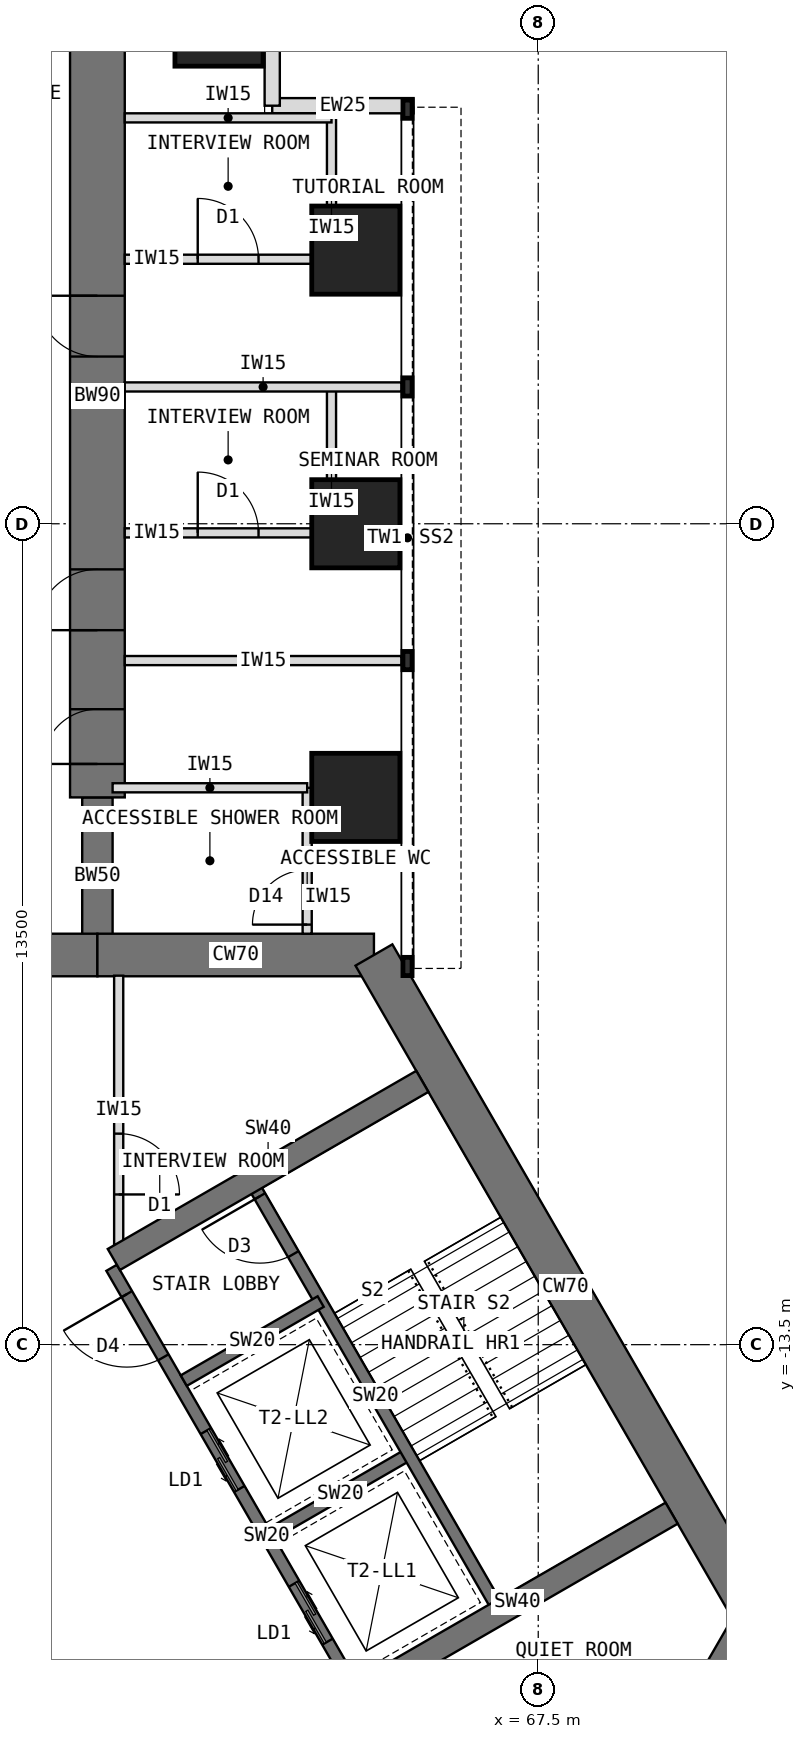
"""IFC4 building model, lengths in metres.
Left out: names, types, materials, properties, quantities, classifications, styles, units other than length and angle.
Written with IfcOpenShell. Run it as: python <this file> out.ifc"""

import sys

from ifc_helpers import new_model, si_unit, direction, frame, frame_2d, origin, origin_2d, place, context, subcontext, project, spatial, rectangle, extrude, element, fill, save


model = new_model("IFC4")
c1 = context("Model", 3, precision=1e-05, world=origin(), true_north=direction((0.0, 1.0)))
c2 = subcontext(c1, "Body", "Model", "MODEL_VIEW")
j1 = project(units=[si_unit("LENGTHUNIT", "METRE"), si_unit("PLANEANGLEUNIT", "RADIAN")], contexts=[c1])
p1 = place(None, origin())
s1 = spatial("IfcSite", under=j1, at=p1, CompositionType="ELEMENT")
p2 = place(p1, origin())
s2 = spatial("IfcBuilding", under=s1, at=p2, CompositionType="ELEMENT")
p3 = place(p2, frame((0.0, 0.0, 64.5)))
s3 = spatial("IfcBuildingStorey", under=s2, at=p3, CompositionType="ELEMENT", Elevation=64.5)
p4 = place(p3, frame((64.798, -7.092, 0.0), z_axis=(0.0, 0.0, 1.0), x_axis=(-1.0, 0.0, 0.0)))
e1 = element("IfcWall", 1, at=p4, inside=s3, PredefinedType="SHEAR", context=c2, shape_type="SweptSolid", body=[
    extrude(rectangle(XDim=4.548, YDim=0.7, at=frame_2d((2.274, 0.0))), origin(), (0.0, 0.0, 1.0), 4.0),
])
p5 = place(p3, frame((60.25, -7.092, 0.0), z_axis=(0.0, 0.0, 1.0), x_axis=(-1.0, 0.0, 0.0)))
e2 = element("IfcWall", 2, at=p5, inside=s3, PredefinedType="SHEAR", context=c2, shape_type="SweptSolid", body=[
    extrude(rectangle(XDim=3.5, YDim=0.7, at=frame_2d((1.75, 0.0))), origin(), (0.0, 0.0, 1.0), 4.0),
])
p6 = place(p5, frame((0.85, 0.0, 0.0)))
e3 = element("IfcOpeningElement", 3, at=p6, cuts=e2, PredefinedType="OPENING", context=c2, shape_type="SweptSolid", body=[
    extrude(rectangle(XDim=1.8, YDim=2.1, at=frame_2d((0.9, 1.05))), frame((0.0, 0.36, 0.0), z_axis=(0.0, -1.0, 0.0), x_axis=(1.0, 0.0, 0.0)), (0.0, 0.0, 1.0), 0.72),
])
p7 = place(p3, frame((68.822, -21.939, 0.0), z_axis=(0.0, 0.0, 1.0), x_axis=(0.500024481964, 0.866011268655, 0.0)))
e4 = element("IfcWall", 4, at=p7, inside=s3, PredefinedType="SHEAR", context=c2, shape_type="SweptSolid", body=[
    extrude(rectangle(XDim=4.548, YDim=0.7, at=frame_2d((2.274, 0.0))), origin(), (0.0, 0.0, 1.0), 4.0),
])
p8 = place(p3, frame((71.096, -18.0, 0.0), z_axis=(0.0, 0.0, 1.0), x_axis=(-0.500005998175, 0.866021940709, 0.0)))
e5 = element("IfcWall", 5, at=p8, inside=s3, PredefinedType="SHEAR", context=c2, shape_type="SweptSolid", body=[
    extrude(rectangle(XDim=12.596, YDim=0.7, at=frame_2d((6.298, 0.0))), origin(), (0.0, 0.0, 1.0), 4.0),
])
p9 = place(p3, frame((60.25, -7.092, 0.0), z_axis=(0.0, 0.0, 1.0), x_axis=(0.0, 1.0, 0.0)))
e6 = element("IfcWall", 6, at=p9, inside=s3, PredefinedType="SHEAR", context=c2, shape_type="SweptSolid", body=[
    extrude(rectangle(XDim=2.592, YDim=0.5, at=frame_2d((1.296, 0.0))), origin(), (0.0, 0.0, 1.0), 4.0),
])
p10 = place(p3, frame((60.25, -4.5, 0.0), z_axis=(0.0, 0.0, 1.0), x_axis=(0.0, 1.0, 0.0)))
e7 = element("IfcWall", 7, at=p10, inside=s3, PredefinedType="SHEAR", context=c2, shape_type="SweptSolid", body=[
    extrude(rectangle(XDim=13.2, YDim=0.9, at=frame_2d((6.6, 0.0))), origin(), (0.0, 0.0, 1.0), 4.0),
])
p11 = place(p10, frame((0.55, 0.0, 0.0)))
e8 = element("IfcOpeningElement", 8, at=p11, cuts=e7, PredefinedType="OPENING", context=c2, shape_type="SweptSolid", body=[
    extrude(rectangle(XDim=0.9, YDim=2.1, at=frame_2d((0.45, 1.05))), frame((0.0, 0.46, 0.0), z_axis=(0.0, -1.0, 0.0), x_axis=(1.0, 0.0, 0.0)), (0.0, 0.0, 1.0), 0.92),
])
p12 = place(p10, frame((2.75, 0.0, 0.0)))
e9 = element("IfcOpeningElement", 9, at=p12, cuts=e7, PredefinedType="OPENING", context=c2, shape_type="SweptSolid", body=[
    extrude(rectangle(XDim=1.0, YDim=2.1, at=frame_2d((0.5, 1.05))), frame((0.0, 0.46, 0.0), z_axis=(0.0, -1.0, 0.0), x_axis=(1.0, 0.0, 0.0)), (0.0, 0.0, 1.0), 0.92),
])
p13 = place(p10, frame((7.25, 0.0, 0.0)))
e10 = element("IfcOpeningElement", 10, at=p13, cuts=e7, PredefinedType="OPENING", context=c2, shape_type="SweptSolid", body=[
    extrude(rectangle(XDim=1.0, YDim=2.1, at=frame_2d((0.5, 1.05))), frame((0.0, 0.46, 0.0), z_axis=(0.0, -1.0, 0.0), x_axis=(1.0, 0.0, 0.0)), (0.0, 0.0, 1.0), 0.92),
])
for number, where, z_axis, x_axis in (
    (11, (64.5, -4.5, 0.0), (0.0, 0.0, 1.0), (1.0, 0.0, 0.0)),
    (12, (64.5, 0.0, 0.0), (0.0, 0.0, 1.0), (1.0, 0.0, 0.0)),
    (13, (64.5, 4.5, 0.0), (0.0, 0.0, 1.0), (1.0, 0.0, 0.0)),
    (14, (62.25, 8.25, 0.0), (0.0, 0.0, 1.0), (1.0, 0.0, 0.0)),
):
    element("IfcColumn", number, at=place(p3, frame(where, z_axis=z_axis, x_axis=x_axis)), inside=s3, PredefinedType="COLUMN", context=c2, shape_type="SweptSolid", body=[
        extrude(rectangle(XDim=1.45, YDim=1.45, at=origin_2d()), origin(), (0.0, 0.0, 1.0), 4.0),
    ])
for number, where, z_axis, x_axis in (
    (15, (65.45, 6.875, 0.0), (0.0, 0.0, 1.0), (-1.0, 0.0, 0.0)),
    (16, (63.125, 6.875, 0.0), (0.0, 0.0, 1.0), (0.0, 1.0, 0.0)),
):
    element("IfcWall", number, at=place(p3, frame(where, z_axis=z_axis, x_axis=x_axis)), inside=s3, PredefinedType="STANDARD", context=c2, shape_type="SweptSolid", body=[
        extrude(rectangle(XDim=2.325, YDim=0.25, at=frame_2d((1.163, 0.0))), origin(), (0.0, 0.0, 1.0), 3.8),
    ])
p14 = place(p3, frame((64.484, -19.164, 0.0), z_axis=(0.0, 0.0, 1.0), x_axis=(-0.49999894854, 0.866026010844, 0.0)))
e17 = element("IfcWall", 17, at=p14, inside=s3, PredefinedType="SHEAR", context=c2, shape_type="SweptSolid", body=[
    extrude(rectangle(XDim=8.0, YDim=0.2, at=frame_2d((4.0, 0.0))), origin(), (0.0, 0.0, 1.0), 4.0),
])
p15 = place(p14, frame((6.3, 0.0, 0.0)))
e18 = element("IfcOpeningElement", 18, at=p15, cuts=e17, PredefinedType="OPENING", context=c2, shape_type="SweptSolid", body=[
    extrude(rectangle(XDim=1.2, YDim=2.1, at=frame_2d((0.6, 1.05))), frame((0.0, 0.11, 0.0), z_axis=(0.0, -1.0, 0.0), x_axis=(1.0, 0.0, 0.0)), (0.0, 0.0, 1.0), 0.22),
])
p16 = place(p14, frame((0.9, 0.0, 0.0)))
e19 = element("IfcOpeningElement", 19, at=p16, cuts=e17, PredefinedType="OPENING", context=c2, shape_type="SweptSolid", body=[
    extrude(rectangle(XDim=1.1, YDim=2.2, at=frame_2d((0.55, 1.1))), frame((0.0, 0.11, 0.0), z_axis=(0.0, -1.0, 0.0), x_axis=(1.0, 0.0, 0.0)), (0.0, 0.0, 1.0), 0.22),
])
p17 = place(p14, frame((3.8, 0.0, 0.0)))
e20 = element("IfcOpeningElement", 20, at=p17, cuts=e17, PredefinedType="OPENING", context=c2, shape_type="SweptSolid", body=[
    extrude(rectangle(XDim=1.1, YDim=2.2, at=frame_2d((0.55, 1.1))), frame((0.0, 0.11, 0.0), z_axis=(0.0, -1.0, 0.0), x_axis=(1.0, 0.0, 0.0)), (0.0, 0.0, 1.0), 0.22),
])
p18 = place(p3, frame((63.12, -16.603, 0.0), z_axis=(0.0, 0.0, 1.0), x_axis=(0.866062058628, 0.499936506574, 0.0)))
e21 = element("IfcWall", 21, at=p18, inside=s3, PredefinedType="SHEAR", context=c2, shape_type="SweptSolid", body=[
    extrude(rectangle(XDim=2.6, YDim=0.2, at=frame_2d((1.3, 0.0))), origin(), (0.0, 0.0, 1.0), 4.0),
])
p19 = place(p3, frame((61.67, -14.091, 0.0), z_axis=(0.0, 0.0, 1.0), x_axis=(0.86603858612, 0.49997716683, 0.0)))
e22 = element("IfcWall", 22, at=p19, inside=s3, PredefinedType="SHEAR", context=c2, shape_type="SweptSolid", body=[
    extrude(rectangle(XDim=2.6, YDim=0.2, at=frame_2d((1.3, 0.0))), origin(), (0.0, 0.0, 1.0), 4.0),
])
p20 = place(p3, frame((66.822, -17.814, 0.0), z_axis=(0.0, 0.0, 1.0), x_axis=(-0.49999894854, 0.866026010844, 0.0)))
e23 = element("IfcWall", 23, at=p20, inside=s3, PredefinedType="SHEAR", context=c2, shape_type="SweptSolid", body=[
    extrude(rectangle(XDim=8.0, YDim=0.2, at=frame_2d((4.0, 0.0))), origin(), (0.0, 0.0, 1.0), 4.0),
])
p21 = place(p20, frame((6.7, 0.0, 0.0)))
e24 = element("IfcOpeningElement", 24, at=p21, cuts=e23, PredefinedType="OPENING", context=c2, shape_type="SweptSolid", body=[
    extrude(rectangle(XDim=1.1, YDim=2.1, at=frame_2d((0.55, 1.05))), frame((0.0, 0.11, 0.0), z_axis=(0.0, -1.0, 0.0), x_axis=(1.0, 0.0, 0.0)), (0.0, 0.0, 1.0), 0.22),
])
for number, where, z_axis, x_axis in (
    (25, (60.52, -12.099, 0.0), (0.0, 0.0, 1.0), (0.866, 0.5, 0.0)),
    (26, (64.62, -19.201, 0.0), (0.0, 0.0, 1.0), (0.866, 0.5, 0.0)),
):
    element("IfcWall", number, at=place(p3, frame(where, z_axis=z_axis, x_axis=x_axis)), inside=s3, PredefinedType="SHEAR", context=c2, shape_type="SweptSolid", body=[
        extrude(rectangle(XDim=5.858, YDim=0.4, at=frame_2d((2.929, 0.0))), origin(), (0.0, 0.0, 1.0), 4.0),
    ])
for number, where, z_axis, x_axis in (
    (27, (60.7, -2.25, 0.0), (0.0, 0.0, 1.0), (1.0, 0.0, 0.0)),
    (28, (60.7, 2.25, 0.0), (0.0, 0.0, 1.0), (1.0, 0.0, 0.0)),
):
    element("IfcWall", number, at=place(p3, frame(where, z_axis=z_axis, x_axis=x_axis)), inside=s3, PredefinedType="PARTITIONING", context=c2, shape_type="SweptSolid", body=[
        extrude(rectangle(XDim=4.55, YDim=0.15, at=frame_2d((2.275, 0.0))), origin(), (0.0, 0.0, 1.0), 3.8),
    ])
p22 = place(p3, frame((64.1, -0.15, 0.0), z_axis=(0.0, 0.0, 1.0), x_axis=(0.0, 1.0, 0.0)))
e29 = element("IfcWall", 29, at=p22, inside=s3, PredefinedType="PARTITIONING", context=c2, shape_type="SweptSolid", body=[
    extrude(rectangle(XDim=2.4, YDim=0.15, at=frame_2d((1.2, 0.0))), origin(), (0.0, 0.0, 1.0), 3.8),
])
p23 = place(p3, frame((60.7, -0.15, 0.0), z_axis=(0.0, 0.0, 1.0), x_axis=(1.0, 0.0, 0.0)))
e30 = element("IfcWall", 30, at=p23, inside=s3, PredefinedType="PARTITIONING", context=c2, shape_type="SweptSolid", body=[
    extrude(rectangle(XDim=3.4, YDim=0.15, at=frame_2d((1.7, 0.0))), origin(), (0.0, 0.0, 1.0), 3.8),
])
p24 = place(p23, frame((1.2, 0.0, 0.0)))
e31 = element("IfcOpeningElement", 31, at=p24, cuts=e30, PredefinedType="OPENING", context=c2, shape_type="SweptSolid", body=[
    extrude(rectangle(XDim=1.0, YDim=2.1, at=frame_2d((0.5, 1.05))), frame((0.0, 0.085, 0.0), z_axis=(0.0, -1.0, 0.0), x_axis=(1.0, 0.0, 0.0)), (0.0, 0.0, 1.0), 0.17),
])
p25 = place(p3, frame((64.1, 4.35, 0.0), z_axis=(0.0, 0.0, 1.0), x_axis=(0.0, 1.0, 0.0)))
e32 = element("IfcWall", 32, at=p25, inside=s3, PredefinedType="PARTITIONING", context=c2, shape_type="SweptSolid", body=[
    extrude(rectangle(XDim=2.4, YDim=0.15, at=frame_2d((1.2, 0.0))), origin(), (0.0, 0.0, 1.0), 3.8),
])
p26 = place(p3, frame((60.7, 4.35, 0.0), z_axis=(0.0, 0.0, 1.0), x_axis=(1.0, 0.0, 0.0)))
e33 = element("IfcWall", 33, at=p26, inside=s3, PredefinedType="PARTITIONING", context=c2, shape_type="SweptSolid", body=[
    extrude(rectangle(XDim=3.4, YDim=0.15, at=frame_2d((1.7, 0.0))), origin(), (0.0, 0.0, 1.0), 3.8),
])
p27 = place(p26, frame((1.2, 0.0, 0.0)))
e34 = element("IfcOpeningElement", 34, at=p27, cuts=e33, PredefinedType="OPENING", context=c2, shape_type="SweptSolid", body=[
    extrude(rectangle(XDim=1.0, YDim=2.1, at=frame_2d((0.5, 1.05))), frame((0.0, 0.085, 0.0), z_axis=(0.0, -1.0, 0.0), x_axis=(1.0, 0.0, 0.0)), (0.0, 0.0, 1.0), 0.17),
])
p28 = place(p3, frame((60.7, 6.675, 0.0), z_axis=(0.0, 0.0, 1.0), x_axis=(1.0, 0.0, 0.0)))
e35 = element("IfcWall", 35, at=p28, inside=s3, PredefinedType="PARTITIONING", context=c2, shape_type="SweptSolid", body=[
    extrude(rectangle(XDim=3.4, YDim=0.15, at=frame_2d((1.7, 0.0))), origin(), (0.0, 0.0, 1.0), 3.8),
])
p29 = place(p3, frame((63.7, -6.742, 0.0), z_axis=(0.0, 0.0, 1.0), x_axis=(0.0, 1.0, 0.0)))
e36 = element("IfcWall", 36, at=p29, inside=s3, PredefinedType="PARTITIONING", context=c2, shape_type="SweptSolid", body=[
    extrude(rectangle(XDim=2.4, YDim=0.15, at=frame_2d((1.2, 0.0))), origin(), (0.0, 0.0, 1.0), 3.8),
])
p30 = place(p29, frame((0.15, 0.0, 0.0)))
e37 = element("IfcOpeningElement", 37, at=p30, cuts=e36, PredefinedType="OPENING", context=c2, shape_type="SweptSolid", body=[
    extrude(rectangle(XDim=0.9, YDim=2.1, at=frame_2d((0.45, 1.05))), frame((0.0, 0.085, 0.0), z_axis=(0.0, -1.0, 0.0), x_axis=(1.0, 0.0, 0.0)), (0.0, 0.0, 1.0), 0.17),
])
p31 = place(p3, frame((60.5, -4.342, 0.0), z_axis=(0.0, 0.0, 1.0), x_axis=(1.0, 0.0, 0.0)))
e38 = element("IfcWall", 38, at=p31, inside=s3, PredefinedType="PARTITIONING", context=c2, shape_type="SweptSolid", body=[
    extrude(rectangle(XDim=3.2, YDim=0.15, at=frame_2d((1.6, 0.0))), origin(), (0.0, 0.0, 1.0), 3.8),
])
p32 = place(p3, frame((60.6, -7.432, 0.0), z_axis=(0.0, 0.0, 1.0), x_axis=(0.0, -1.0, 0.0)))
e39 = element("IfcWall", 39, at=p32, inside=s3, PredefinedType="PARTITIONING", context=c2, shape_type="SweptSolid", body=[
    extrude(rectangle(XDim=4.426, YDim=0.15, at=frame_2d((2.213, 0.0))), origin(), (0.0, 0.0, 1.0), 3.8),
])
p33 = place(p32, frame((2.598, 0.0, 0.0)))
e40 = element("IfcOpeningElement", 40, at=p33, cuts=e39, PredefinedType="OPENING", context=c2, shape_type="SweptSolid", body=[
    extrude(rectangle(XDim=1.0, YDim=2.1, at=frame_2d((0.5, 1.05))), frame((0.0, 0.085, 0.0), z_axis=(0.0, -1.0, 0.0), x_axis=(1.0, 0.0, 0.0)), (0.0, 0.0, 1.0), 0.17),
])
p34 = place(p15, origin())
e41 = element("IfcDoor", 41, at=p34, inside=s3, OperationType="SINGLE_SWING_RIGHT", PredefinedType="DOOR", context=c2, shape_type="SweptSolid", body=[
    extrude(rectangle(XDim=1.2, YDim=2.1, at=frame_2d((0.6, 1.05))), frame((0.0, 0.025, 0.0), z_axis=(0.0, -1.0, 0.0), x_axis=(1.0, 0.0, 0.0)), (0.0, 0.0, 1.0), 0.05),
])
fill(e18, e41)
p35 = place(p16, origin())
e42 = element("IfcDoor", 42, at=p35, inside=s3, OperationType="DOUBLE_DOOR_SLIDING", PredefinedType="DOOR", context=c2, shape_type="SweptSolid", body=[
    extrude(rectangle(XDim=1.1, YDim=2.2, at=frame_2d((0.55, 1.1))), frame((0.0, 0.025, 0.0), z_axis=(0.0, -1.0, 0.0), x_axis=(1.0, 0.0, 0.0)), (0.0, 0.0, 1.0), 0.05),
])
fill(e19, e42)
p36 = place(p17, origin())
e43 = element("IfcDoor", 43, at=p36, inside=s3, OperationType="DOUBLE_DOOR_SLIDING", PredefinedType="DOOR", context=c2, shape_type="SweptSolid", body=[
    extrude(rectangle(XDim=1.1, YDim=2.2, at=frame_2d((0.55, 1.1))), frame((0.0, 0.025, 0.0), z_axis=(0.0, -1.0, 0.0), x_axis=(1.0, 0.0, 0.0)), (0.0, 0.0, 1.0), 0.05),
])
fill(e20, e43)
p37 = place(p21, origin())
e44 = element("IfcDoor", 44, at=p37, inside=s3, OperationType="SINGLE_SWING_RIGHT", PredefinedType="DOOR", context=c2, shape_type="SweptSolid", body=[
    extrude(rectangle(XDim=1.1, YDim=2.1, at=frame_2d((0.55, 1.05))), frame((0.0, 0.025, 0.0), z_axis=(0.0, -1.0, 0.0), x_axis=(1.0, 0.0, 0.0)), (0.0, 0.0, 1.0), 0.05),
])
fill(e24, e44)
p38 = place(p24, origin())
e45 = element("IfcDoor", 45, at=p38, inside=s3, OperationType="SINGLE_SWING_LEFT", PredefinedType="DOOR", context=c2, shape_type="SweptSolid", body=[
    extrude(rectangle(XDim=1.0, YDim=2.1, at=frame_2d((0.5, 1.05))), frame((0.0, 0.025, 0.0), z_axis=(0.0, -1.0, 0.0), x_axis=(1.0, 0.0, 0.0)), (0.0, 0.0, 1.0), 0.05),
])
fill(e31, e45)
p39 = place(p27, origin())
e46 = element("IfcDoor", 46, at=p39, inside=s3, OperationType="SINGLE_SWING_LEFT", PredefinedType="DOOR", context=c2, shape_type="SweptSolid", body=[
    extrude(rectangle(XDim=1.0, YDim=2.1, at=frame_2d((0.5, 1.05))), frame((0.0, 0.025, 0.0), z_axis=(0.0, -1.0, 0.0), x_axis=(1.0, 0.0, 0.0)), (0.0, 0.0, 1.0), 0.05),
])
fill(e34, e46)
p40 = place(p30, origin())
e47 = element("IfcDoor", 47, at=p40, inside=s3, OperationType="SINGLE_SWING_LEFT", PredefinedType="DOOR", context=c2, shape_type="SweptSolid", body=[
    extrude(rectangle(XDim=0.9, YDim=2.1, at=frame_2d((0.45, 1.05))), frame((0.0, 0.025, 0.0), z_axis=(0.0, -1.0, 0.0), x_axis=(1.0, 0.0, 0.0)), (0.0, 0.0, 1.0), 0.05),
])
fill(e37, e47)
p41 = place(p33, origin())
e48 = element("IfcDoor", 48, at=p41, inside=s3, OperationType="SINGLE_SWING_RIGHT", PredefinedType="DOOR", context=c2, shape_type="SweptSolid", body=[
    extrude(rectangle(XDim=1.0, YDim=2.1, at=frame_2d((0.5, 1.05))), frame((0.0, 0.025, 0.0), z_axis=(0.0, -1.0, 0.0), x_axis=(1.0, 0.0, 0.0)), (0.0, 0.0, 1.0), 0.05),
])
fill(e40, e48)
p42 = place(p11, origin())
e49 = element("IfcDoor", 49, at=p42, inside=s3, OperationType="SINGLE_SWING_LEFT", PredefinedType="DOOR", context=c2, shape_type="SweptSolid", body=[
    extrude(rectangle(XDim=0.82, YDim=2.06, at=frame_2d((0.45, 1.03))), frame((0.0, 0.025, 0.0), z_axis=(0.0, -1.0, 0.0), x_axis=(1.0, 0.0, 0.0)), (0.0, 0.0, 1.0), 0.05),
    extrude(rectangle(XDim=0.04, YDim=2.1, at=frame_2d((0.02, 1.05))), frame((0.0, 0.45, 0.0), z_axis=(0.0, -1.0, 0.0), x_axis=(1.0, 0.0, 0.0)), (0.0, 0.0, 1.0), 0.899),
    extrude(rectangle(XDim=0.04, YDim=2.1, at=frame_2d((0.88, 1.05))), frame((0.0, 0.45, 0.0), z_axis=(0.0, -1.0, 0.0), x_axis=(1.0, 0.0, 0.0)), (0.0, 0.0, 1.0), 0.899),
    extrude(rectangle(XDim=0.82, YDim=0.04, at=frame_2d((0.45, 2.08))), frame((0.0, 0.45, 0.0), z_axis=(0.0, -1.0, 0.0), x_axis=(1.0, 0.0, 0.0)), (0.0, 0.0, 1.0), 0.899),
])
fill(e8, e49)
p43 = place(p12, origin())
e50 = element("IfcDoor", 50, at=p43, inside=s3, OperationType="SINGLE_SWING_LEFT", PredefinedType="DOOR", context=c2, shape_type="SweptSolid", body=[
    extrude(rectangle(XDim=0.92, YDim=2.06, at=frame_2d((0.5, 1.03))), frame((0.0, 0.025, 0.0), z_axis=(0.0, -1.0, 0.0), x_axis=(1.0, 0.0, 0.0)), (0.0, 0.0, 1.0), 0.05),
    extrude(rectangle(XDim=0.04, YDim=2.1, at=frame_2d((0.02, 1.05))), frame((0.0, 0.45, 0.0), z_axis=(0.0, -1.0, 0.0), x_axis=(1.0, 0.0, 0.0)), (0.0, 0.0, 1.0), 0.899),
    extrude(rectangle(XDim=0.04, YDim=2.1, at=frame_2d((0.98, 1.05))), frame((0.0, 0.45, 0.0), z_axis=(0.0, -1.0, 0.0), x_axis=(1.0, 0.0, 0.0)), (0.0, 0.0, 1.0), 0.899),
    extrude(rectangle(XDim=0.92, YDim=0.04, at=frame_2d((0.5, 2.08))), frame((0.0, 0.45, 0.0), z_axis=(0.0, -1.0, 0.0), x_axis=(1.0, 0.0, 0.0)), (0.0, 0.0, 1.0), 0.899),
])
fill(e9, e50)
p44 = place(p13, origin())
e51 = element("IfcDoor", 51, at=p44, inside=s3, OperationType="SINGLE_SWING_RIGHT", PredefinedType="DOOR", context=c2, shape_type="SweptSolid", body=[
    extrude(rectangle(XDim=0.92, YDim=2.06, at=frame_2d((0.5, 1.03))), frame((0.0, 0.025, 0.0), z_axis=(0.0, -1.0, 0.0), x_axis=(1.0, 0.0, 0.0)), (0.0, 0.0, 1.0), 0.05),
    extrude(rectangle(XDim=0.04, YDim=2.1, at=frame_2d((0.02, 1.05))), frame((0.0, 0.45, 0.0), z_axis=(0.0, -1.0, 0.0), x_axis=(1.0, 0.0, 0.0)), (0.0, 0.0, 1.0), 0.899),
    extrude(rectangle(XDim=0.04, YDim=2.1, at=frame_2d((0.98, 1.05))), frame((0.0, 0.45, 0.0), z_axis=(0.0, -1.0, 0.0), x_axis=(1.0, 0.0, 0.0)), (0.0, 0.0, 1.0), 0.899),
    extrude(rectangle(XDim=0.92, YDim=0.04, at=frame_2d((0.5, 2.08))), frame((0.0, 0.45, 0.0), z_axis=(0.0, -1.0, 0.0), x_axis=(1.0, 0.0, 0.0)), (0.0, 0.0, 1.0), 0.899),
])
fill(e10, e51)
save(model, sys.argv[1])
